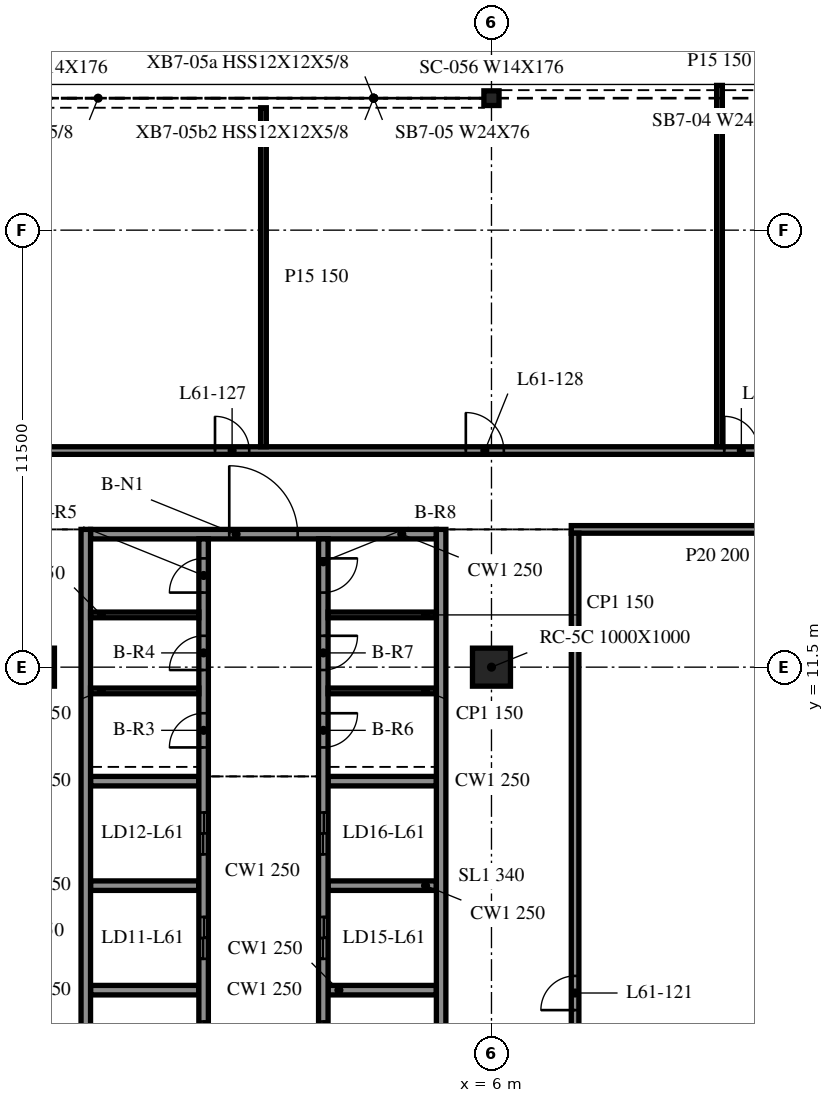
"""IFC4 building model, lengths in metres.
Left out: names, types, materials, properties, quantities, classifications, styles, units other than length and angle.
Written with IfcOpenShell. Run it as: python <this file> out.ifc"""

import sys

from ifc_helpers import new_model, si_unit, direction, frame, frame_2d, origin, origin_2d, place, context, subcontext, project, spatial, rectangle, i_section, extrude, element, fill, save


model = new_model("IFC4")
c1 = context("Model", 3, precision=1e-05, world=origin(), true_north=direction((0.0, 1.0)))
c2 = subcontext(c1, "Body", "Model", "MODEL_VIEW")
j1 = project(units=[si_unit("LENGTHUNIT", "METRE"), si_unit("PLANEANGLEUNIT", "RADIAN")], contexts=[c1])
p1 = place(None, origin())
s1 = spatial("IfcSite", under=j1, at=p1, CompositionType="ELEMENT")
p2 = place(p1, origin())
s2 = spatial("IfcBuilding", under=s1, at=p2, CompositionType="ELEMENT")
p3 = place(p2, frame((0.0, 0.0, 251.4)))
s3 = spatial("IfcBuildingStorey", under=s2, at=p3, CompositionType="ELEMENT", Elevation=251.4)
for number, where, z_axis, x_axis in (
    (1, (-6.0, 11.5, -0.34), (0.0, 0.0, 1.0), (1.0, 0.0, 0.0)),
    (2, (6.0, 11.5, -0.34), (0.0, 0.0, 1.0), (1.0, 0.0, 0.0)),
):
    element("IfcColumn", number, at=place(p3, frame(where, z_axis=z_axis, x_axis=x_axis)), inside=s3, PredefinedType="COLUMN", context=c2, shape_type="SweptSolid", body=[
        extrude(rectangle(XDim=1.0, YDim=1.0, at=origin_2d()), origin(), (0.0, 0.0, 1.0), 3.8),
    ])
p4 = place(p3, frame((6.0, 26.473, -0.34), z_axis=(0.0, 0.0, 1.0), x_axis=(1.0, 0.0, 0.0)))
e3 = element("IfcColumn", 3, at=p4, inside=s3, PredefinedType="COLUMN", context=c2, shape_type="SweptSolid", body=[
    extrude(i_section(OverallWidth=0.399, OverallDepth=0.386, WebThickness=0.021, FlangeThickness=0.033, at=origin_2d()), origin(), (0.0, 0.0, 1.0), 3.8),
])
for number, where, z_axis, x_axis in (
    (4, (-4.675, 15.125, 0.0), (0.0, 0.0, 1.0), (0.0, -1.0, 0.0)),
    (5, (4.675, -9.125, 0.0), (0.0, 0.0, 1.0), (0.0, 1.0, 0.0)),
):
    element("IfcWall", number, at=place(p3, frame(where, z_axis=z_axis, x_axis=x_axis)), inside=s3, PredefinedType="SOLIDWALL", context=c2, shape_type="SweptSolid", body=[
        extrude(rectangle(XDim=24.25, YDim=0.25, at=frame_2d((12.125, 0.0))), origin(), (0.0, 0.0, 1.0), 3.46),
    ])
p5 = place(p3, frame((-4.55, 15.0, 0.0), z_axis=(0.0, 0.0, 1.0), x_axis=(1.0, 0.0, 0.0)))
e6 = element("IfcWall", 6, at=p5, inside=s3, PredefinedType="SOLIDWALL", context=c2, shape_type="SweptSolid", body=[
    extrude(rectangle(XDim=9.1, YDim=0.25, at=frame_2d((4.55, 0.0))), origin(), (0.0, 0.0, 1.0), 3.46),
])
p6 = place(p5, frame((3.65, 0.0, 0.0)))
e7 = element("IfcOpeningElement", 7, at=p6, cuts=e6, PredefinedType="OPENING", context=c2, shape_type="SweptSolid", body=[
    extrude(rectangle(XDim=1.8, YDim=2.1, at=frame_2d((0.9, 1.05))), frame((0.0, 0.135, 0.0), z_axis=(0.0, -1.0, 0.0), x_axis=(1.0, 0.0, 0.0)), (0.0, 0.0, 1.0), 0.27),
])
p7 = place(p3, frame((-1.575, -8.875, 0.0), z_axis=(0.0, 0.0, 1.0), x_axis=(0.0, 1.0, 0.0)))
e8 = element("IfcWall", 8, at=p7, inside=s3, PredefinedType="SOLIDWALL", context=c2, shape_type="SweptSolid", body=[
    extrude(rectangle(XDim=23.75, YDim=0.25, at=frame_2d((11.875, 0.0))), origin(), (0.0, 0.0, 1.0), 3.46),
])
p8 = place(p7, frame((7.2, 0.0, 0.0)))
e9 = element("IfcOpeningElement", 9, at=p8, cuts=e8, PredefinedType="OPENING", context=c2, shape_type="SweptSolid", body=[
    extrude(rectangle(XDim=1.1, YDim=2.1, at=frame_2d((0.55, 1.05))), frame((0.0, 0.135, 0.0), z_axis=(0.0, -1.0, 0.0), x_axis=(1.0, 0.0, 0.0)), (0.0, 0.0, 1.0), 0.27),
])
p9 = place(p7, frame((9.95, 0.0, 0.0)))
e10 = element("IfcOpeningElement", 10, at=p9, cuts=e8, PredefinedType="OPENING", context=c2, shape_type="SweptSolid", body=[
    extrude(rectangle(XDim=1.1, YDim=2.1, at=frame_2d((0.55, 1.05))), frame((0.0, 0.135, 0.0), z_axis=(0.0, -1.0, 0.0), x_axis=(1.0, 0.0, 0.0)), (0.0, 0.0, 1.0), 0.27),
])
p10 = place(p7, frame((12.7, 0.0, 0.0)))
e11 = element("IfcOpeningElement", 11, at=p10, cuts=e8, PredefinedType="OPENING", context=c2, shape_type="SweptSolid", body=[
    extrude(rectangle(XDim=1.1, YDim=2.1, at=frame_2d((0.55, 1.05))), frame((0.0, 0.135, 0.0), z_axis=(0.0, -1.0, 0.0), x_axis=(1.0, 0.0, 0.0)), (0.0, 0.0, 1.0), 0.27),
])
p11 = place(p7, frame((15.45, 0.0, 0.0)))
e12 = element("IfcOpeningElement", 12, at=p11, cuts=e8, PredefinedType="OPENING", context=c2, shape_type="SweptSolid", body=[
    extrude(rectangle(XDim=1.1, YDim=2.1, at=frame_2d((0.55, 1.05))), frame((0.0, 0.135, 0.0), z_axis=(0.0, -1.0, 0.0), x_axis=(1.0, 0.0, 0.0)), (0.0, 0.0, 1.0), 0.27),
])
p12 = place(p7, frame((1.012, 0.0, 0.0)))
e13 = element("IfcOpeningElement", 13, at=p12, cuts=e8, PredefinedType="OPENING", context=c2, shape_type="SweptSolid", body=[
    extrude(rectangle(XDim=0.9, YDim=2.1, at=frame_2d((0.45, 1.05))), frame((0.0, 0.135, 0.0), z_axis=(0.0, -1.0, 0.0), x_axis=(1.0, 0.0, 0.0)), (0.0, 0.0, 1.0), 0.27),
])
p13 = place(p7, frame((4.087, 0.0, 0.0)))
e14 = element("IfcOpeningElement", 14, at=p13, cuts=e8, PredefinedType="OPENING", context=c2, shape_type="SweptSolid", body=[
    extrude(rectangle(XDim=0.9, YDim=2.1, at=frame_2d((0.45, 1.05))), frame((0.0, 0.135, 0.0), z_axis=(0.0, -1.0, 0.0), x_axis=(1.0, 0.0, 0.0)), (0.0, 0.0, 1.0), 0.27),
])
p14 = place(p7, frame((18.262, 0.0, 0.0)))
e15 = element("IfcOpeningElement", 15, at=p14, cuts=e8, PredefinedType="OPENING", context=c2, shape_type="SweptSolid", body=[
    extrude(rectangle(XDim=0.9, YDim=2.1, at=frame_2d((0.45, 1.05))), frame((0.0, 0.135, 0.0), z_axis=(0.0, -1.0, 0.0), x_axis=(1.0, 0.0, 0.0)), (0.0, 0.0, 1.0), 0.27),
])
p15 = place(p7, frame((20.3, 0.0, 0.0)))
e16 = element("IfcOpeningElement", 16, at=p15, cuts=e8, PredefinedType="OPENING", context=c2, shape_type="SweptSolid", body=[
    extrude(rectangle(XDim=0.9, YDim=2.1, at=frame_2d((0.45, 1.05))), frame((0.0, 0.135, 0.0), z_axis=(0.0, -1.0, 0.0), x_axis=(1.0, 0.0, 0.0)), (0.0, 0.0, 1.0), 0.27),
])
p16 = place(p7, frame((22.337, 0.0, 0.0)))
e17 = element("IfcOpeningElement", 17, at=p16, cuts=e8, PredefinedType="OPENING", context=c2, shape_type="SweptSolid", body=[
    extrude(rectangle(XDim=0.9, YDim=2.1, at=frame_2d((0.45, 1.05))), frame((0.0, 0.135, 0.0), z_axis=(0.0, -1.0, 0.0), x_axis=(1.0, 0.0, 0.0)), (0.0, 0.0, 1.0), 0.27),
])
p17 = place(p3, frame((1.575, 14.875, 0.0), z_axis=(0.0, 0.0, 1.0), x_axis=(0.0, -1.0, 0.0)))
e18 = element("IfcWall", 18, at=p17, inside=s3, PredefinedType="SOLIDWALL", context=c2, shape_type="SweptSolid", body=[
    extrude(rectangle(XDim=17.5, YDim=0.25, at=frame_2d((8.75, 0.0))), origin(), (0.0, 0.0, 1.0), 3.46),
])
p18 = place(p17, frame((15.45, 0.0, 0.0)))
e19 = element("IfcOpeningElement", 19, at=p18, cuts=e18, PredefinedType="OPENING", context=c2, shape_type="SweptSolid", body=[
    extrude(rectangle(XDim=1.1, YDim=2.1, at=frame_2d((0.55, 1.05))), frame((0.0, 0.135, 0.0), z_axis=(0.0, -1.0, 0.0), x_axis=(1.0, 0.0, 0.0)), (0.0, 0.0, 1.0), 0.27),
])
p19 = place(p17, frame((12.7, 0.0, 0.0)))
e20 = element("IfcOpeningElement", 20, at=p19, cuts=e18, PredefinedType="OPENING", context=c2, shape_type="SweptSolid", body=[
    extrude(rectangle(XDim=1.1, YDim=2.1, at=frame_2d((0.55, 1.05))), frame((0.0, 0.135, 0.0), z_axis=(0.0, -1.0, 0.0), x_axis=(1.0, 0.0, 0.0)), (0.0, 0.0, 1.0), 0.27),
])
p20 = place(p17, frame((9.95, 0.0, 0.0)))
e21 = element("IfcOpeningElement", 21, at=p20, cuts=e18, PredefinedType="OPENING", context=c2, shape_type="SweptSolid", body=[
    extrude(rectangle(XDim=1.1, YDim=2.1, at=frame_2d((0.55, 1.05))), frame((0.0, 0.135, 0.0), z_axis=(0.0, -1.0, 0.0), x_axis=(1.0, 0.0, 0.0)), (0.0, 0.0, 1.0), 0.27),
])
p21 = place(p17, frame((7.2, 0.0, 0.0)))
e22 = element("IfcOpeningElement", 22, at=p21, cuts=e18, PredefinedType="OPENING", context=c2, shape_type="SweptSolid", body=[
    extrude(rectangle(XDim=1.1, YDim=2.1, at=frame_2d((0.55, 1.05))), frame((0.0, 0.135, 0.0), z_axis=(0.0, -1.0, 0.0), x_axis=(1.0, 0.0, 0.0)), (0.0, 0.0, 1.0), 0.27),
])
p22 = place(p17, frame((4.587, 0.0, 0.0)))
e23 = element("IfcOpeningElement", 23, at=p22, cuts=e18, PredefinedType="OPENING", context=c2, shape_type="SweptSolid", body=[
    extrude(rectangle(XDim=0.9, YDim=2.1, at=frame_2d((0.45, 1.05))), frame((0.0, 0.135, 0.0), z_axis=(0.0, -1.0, 0.0), x_axis=(1.0, 0.0, 0.0)), (0.0, 0.0, 1.0), 0.27),
])
p23 = place(p17, frame((2.55, 0.0, 0.0)))
e24 = element("IfcOpeningElement", 24, at=p23, cuts=e18, PredefinedType="OPENING", context=c2, shape_type="SweptSolid", body=[
    extrude(rectangle(XDim=0.9, YDim=2.1, at=frame_2d((0.45, 1.05))), frame((0.0, 0.135, 0.0), z_axis=(0.0, -1.0, 0.0), x_axis=(1.0, 0.0, 0.0)), (0.0, 0.0, 1.0), 0.27),
])
p24 = place(p17, frame((0.512, 0.0, 0.0)))
e25 = element("IfcOpeningElement", 25, at=p24, cuts=e18, PredefinedType="OPENING", context=c2, shape_type="SweptSolid", body=[
    extrude(rectangle(XDim=0.9, YDim=2.1, at=frame_2d((0.45, 1.05))), frame((0.0, 0.135, 0.0), z_axis=(0.0, -1.0, 0.0), x_axis=(1.0, 0.0, 0.0)), (0.0, 0.0, 1.0), 0.27),
])
for number, where, z_axis, x_axis in (
    (26, (-4.55, 3.0, 0.0), (0.0, 0.0, 1.0), (1.0, 0.0, 0.0)),
    (27, (-4.55, 5.75, 0.0), (0.0, 0.0, 1.0), (1.0, 0.0, 0.0)),
    (28, (-4.55, 8.5, 0.0), (0.0, 0.0, 1.0), (1.0, 0.0, 0.0)),
    (29, (1.7, 3.0, 0.0), (0.0, 0.0, 1.0), (1.0, 0.0, 0.0)),
    (30, (1.7, 5.75, 0.0), (0.0, 0.0, 1.0), (1.0, 0.0, 0.0)),
    (31, (1.7, 8.5, 0.0), (0.0, 0.0, 1.0), (1.0, 0.0, 0.0)),
):
    element("IfcWall", number, at=place(p3, frame(where, z_axis=z_axis, x_axis=x_axis)), inside=s3, PredefinedType="SOLIDWALL", context=c2, shape_type="SweptSolid", body=[
        extrude(rectangle(XDim=2.85, YDim=0.25, at=frame_2d((1.425, 0.0))), origin(), (0.0, 0.0, 1.0), 3.46),
    ])
for number, where, z_axis, x_axis in (
    (32, (-4.55, 10.875, 0.0), (0.0, 0.0, 1.0), (1.0, 0.0, 0.0)),
    (33, (-4.55, 12.875, 0.0), (0.0, 0.0, 1.0), (1.0, 0.0, 0.0)),
    (34, (1.7, 10.875, 0.0), (0.0, 0.0, 1.0), (1.0, 0.0, 0.0)),
    (35, (1.7, 12.875, 0.0), (0.0, 0.0, 1.0), (1.0, 0.0, 0.0)),
):
    element("IfcWall", number, at=place(p3, frame(where, z_axis=z_axis, x_axis=x_axis)), inside=s3, PredefinedType="PARTITIONING", context=c2, shape_type="SweptSolid", body=[
        extrude(rectangle(XDim=2.85, YDim=0.15, at=frame_2d((1.425, 0.0))), origin(), (0.0, 0.0, 1.0), 3.46),
    ])
p25 = place(p3, frame((8.1, 15.125, 0.0), z_axis=(0.0, 0.0, 1.0), x_axis=(1.0, 0.0, 0.0)))
e36 = element("IfcWall", 36, at=p25, inside=s3, PredefinedType="PARTITIONING", context=c2, shape_type="SweptSolid", body=[
    extrude(rectangle(XDim=7.7, YDim=0.2, at=frame_2d((3.85, 0.0))), origin(), (0.0, 0.0, 1.0), 3.46),
])
p26 = place(p3, frame((-41.975, 17.2, 0.0), z_axis=(0.0, 0.0, 1.0), x_axis=(1.0, 0.0, 0.0)))
e37 = element("IfcWall", 37, at=p26, inside=s3, PredefinedType="PARTITIONING", context=c2, shape_type="SweptSolid", body=[
    extrude(rectangle(XDim=95.95, YDim=0.2, at=frame_2d((47.975, 0.0))), origin(), (0.0, 0.0, 1.0), 3.46),
])
p27 = place(p26, frame((10.5, 0.0, 0.0)))
e38 = element("IfcOpeningElement", 38, at=p27, cuts=e37, PredefinedType="OPENING", context=c2, shape_type="SweptSolid", body=[
    extrude(rectangle(XDim=1.0, YDim=2.1, at=frame_2d((0.5, 1.05))), frame((0.0, 0.11, 0.0), z_axis=(0.0, -1.0, 0.0), x_axis=(1.0, 0.0, 0.0)), (0.0, 0.0, 1.0), 0.22),
])
p28 = place(p26, frame((22.5, 0.0, 0.0)))
e39 = element("IfcOpeningElement", 39, at=p28, cuts=e37, PredefinedType="OPENING", context=c2, shape_type="SweptSolid", body=[
    extrude(rectangle(XDim=1.0, YDim=2.1, at=frame_2d((0.5, 1.05))), frame((0.0, 0.11, 0.0), z_axis=(0.0, -1.0, 0.0), x_axis=(1.0, 0.0, 0.0)), (0.0, 0.0, 1.0), 0.22),
])
p29 = place(p26, frame((28.5, 0.0, 0.0)))
e40 = element("IfcOpeningElement", 40, at=p29, cuts=e37, PredefinedType="OPENING", context=c2, shape_type="SweptSolid", body=[
    extrude(rectangle(XDim=1.0, YDim=2.1, at=frame_2d((0.5, 1.05))), frame((0.0, 0.11, 0.0), z_axis=(0.0, -1.0, 0.0), x_axis=(1.0, 0.0, 0.0)), (0.0, 0.0, 1.0), 0.22),
])
p30 = place(p26, frame((40.7, 0.0, 0.0)))
e41 = element("IfcOpeningElement", 41, at=p30, cuts=e37, PredefinedType="OPENING", context=c2, shape_type="SweptSolid", body=[
    extrude(rectangle(XDim=0.9, YDim=2.1, at=frame_2d((0.45, 1.05))), frame((0.0, 0.11, 0.0), z_axis=(0.0, -1.0, 0.0), x_axis=(1.0, 0.0, 0.0)), (0.0, 0.0, 1.0), 0.22),
])
p31 = place(p26, frame((47.3, 0.0, 0.0)))
e42 = element("IfcOpeningElement", 42, at=p31, cuts=e37, PredefinedType="OPENING", context=c2, shape_type="SweptSolid", body=[
    extrude(rectangle(XDim=1.0, YDim=2.1, at=frame_2d((0.5, 1.05))), frame((0.0, 0.11, 0.0), z_axis=(0.0, -1.0, 0.0), x_axis=(1.0, 0.0, 0.0)), (0.0, 0.0, 1.0), 0.22),
])
p32 = place(p26, frame((54.1, 0.0, 0.0)))
e43 = element("IfcOpeningElement", 43, at=p32, cuts=e37, PredefinedType="OPENING", context=c2, shape_type="SweptSolid", body=[
    extrude(rectangle(XDim=0.9, YDim=2.1, at=frame_2d((0.45, 1.05))), frame((0.0, 0.11, 0.0), z_axis=(0.0, -1.0, 0.0), x_axis=(1.0, 0.0, 0.0)), (0.0, 0.0, 1.0), 0.22),
])
p33 = place(p26, frame((60.1, 0.0, 0.0)))
e44 = element("IfcOpeningElement", 44, at=p33, cuts=e37, PredefinedType="OPENING", context=c2, shape_type="SweptSolid", body=[
    extrude(rectangle(XDim=1.0, YDim=2.1, at=frame_2d((0.5, 1.05))), frame((0.0, 0.11, 0.0), z_axis=(0.0, -1.0, 0.0), x_axis=(1.0, 0.0, 0.0)), (0.0, 0.0, 1.0), 0.22),
])
p34 = place(p26, frame((72.1, 0.0, 0.0)))
e45 = element("IfcOpeningElement", 45, at=p34, cuts=e37, PredefinedType="OPENING", context=c2, shape_type="SweptSolid", body=[
    extrude(rectangle(XDim=1.0, YDim=2.1, at=frame_2d((0.5, 1.05))), frame((0.0, 0.11, 0.0), z_axis=(0.0, -1.0, 0.0), x_axis=(1.0, 0.0, 0.0)), (0.0, 0.0, 1.0), 0.22),
])
p35 = place(p26, frame((84.1, 0.0, 0.0)))
e46 = element("IfcOpeningElement", 46, at=p35, cuts=e37, PredefinedType="OPENING", context=c2, shape_type="SweptSolid", body=[
    extrude(rectangle(XDim=1.0, YDim=2.1, at=frame_2d((0.5, 1.05))), frame((0.0, 0.11, 0.0), z_axis=(0.0, -1.0, 0.0), x_axis=(1.0, 0.0, 0.0)), (0.0, 0.0, 1.0), 0.22),
])
p36 = place(p26, frame((90.1, 0.0, 0.0)))
e47 = element("IfcOpeningElement", 47, at=p36, cuts=e37, PredefinedType="OPENING", context=c2, shape_type="SweptSolid", body=[
    extrude(rectangle(XDim=0.9, YDim=2.1, at=frame_2d((0.45, 1.05))), frame((0.0, 0.11, 0.0), z_axis=(0.0, -1.0, 0.0), x_axis=(1.0, 0.0, 0.0)), (0.0, 0.0, 1.0), 0.22),
])
p37 = place(p3, frame((0.0, 17.3, 0.0), z_axis=(0.0, 0.0, 1.0), x_axis=(0.0, 1.0, 0.0)))
e48 = element("IfcWall", 48, at=p37, inside=s3, PredefinedType="PARTITIONING", context=c2, shape_type="SweptSolid", body=[
    extrude(rectangle(XDim=8.921, YDim=0.15, at=frame_2d((4.46, 0.0))), origin(), (0.0, 0.0, 1.0), 3.46),
])
p38 = place(p3, frame((8.2, -9.025, 0.0), z_axis=(0.0, 0.0, 1.0), x_axis=(0.0, 1.0, 0.0)))
e49 = element("IfcWall", 49, at=p38, inside=s3, PredefinedType="PARTITIONING", context=c2, shape_type="SweptSolid", body=[
    extrude(rectangle(XDim=24.05, YDim=0.2, at=frame_2d((12.025, 0.0))), origin(), (0.0, 0.0, 1.0), 3.46),
])
p39 = place(p38, frame((11.5, 0.0, 0.0)))
e50 = element("IfcOpeningElement", 50, at=p39, cuts=e49, PredefinedType="OPENING", context=c2, shape_type="SweptSolid", body=[
    extrude(rectangle(XDim=0.9, YDim=2.1, at=frame_2d((0.45, 1.05))), frame((0.0, 0.11, 0.0), z_axis=(0.0, -1.0, 0.0), x_axis=(1.0, 0.0, 0.0)), (0.0, 0.0, 1.0), 0.22),
])
p40 = place(p3, frame((12.0, 17.3, 0.0), z_axis=(0.0, 0.0, 1.0), x_axis=(0.0, 1.0, 0.0)))
e51 = element("IfcWall", 51, at=p40, inside=s3, PredefinedType="PARTITIONING", context=c2, shape_type="SweptSolid", body=[
    extrude(rectangle(XDim=9.509, YDim=0.15, at=frame_2d((4.754, 0.0))), origin(), (0.0, 0.0, 1.0), 3.46),
])
p41 = place(p6, origin())
e52 = element("IfcDoor", 52, at=p41, inside=s3, OperationType="DOUBLE_DOOR_SINGLE_SWING", PredefinedType="DOOR", context=c2, shape_type="SweptSolid", body=[
    extrude(rectangle(XDim=1.8, YDim=2.1, at=frame_2d((0.9, 1.05))), frame((0.0, 0.025, 0.0), z_axis=(0.0, -1.0, 0.0), x_axis=(1.0, 0.0, 0.0)), (0.0, 0.0, 1.0), 0.05),
])
fill(e7, e52)
p42 = place(p19, origin())
e53 = element("IfcDoor", 53, at=p42, inside=s3, OperationType="DOUBLE_DOOR_SLIDING", PredefinedType="DOOR", context=c2, shape_type="SweptSolid", body=[
    extrude(rectangle(XDim=1.1, YDim=2.1, at=frame_2d((0.55, 1.05))), frame((0.0, 0.025, 0.0), z_axis=(0.0, -1.0, 0.0), x_axis=(1.0, 0.0, 0.0)), (0.0, 0.0, 1.0), 0.05),
])
fill(e20, e53)
p43 = place(p20, origin())
e54 = element("IfcDoor", 54, at=p43, inside=s3, OperationType="DOUBLE_DOOR_SLIDING", PredefinedType="DOOR", context=c2, shape_type="SweptSolid", body=[
    extrude(rectangle(XDim=1.1, YDim=2.1, at=frame_2d((0.55, 1.05))), frame((0.0, 0.025, 0.0), z_axis=(0.0, -1.0, 0.0), x_axis=(1.0, 0.0, 0.0)), (0.0, 0.0, 1.0), 0.05),
])
fill(e21, e54)
p44 = place(p21, origin())
e55 = element("IfcDoor", 55, at=p44, inside=s3, OperationType="DOUBLE_DOOR_SLIDING", PredefinedType="DOOR", context=c2, shape_type="SweptSolid", body=[
    extrude(rectangle(XDim=1.1, YDim=2.1, at=frame_2d((0.55, 1.05))), frame((0.0, 0.025, 0.0), z_axis=(0.0, -1.0, 0.0), x_axis=(1.0, 0.0, 0.0)), (0.0, 0.0, 1.0), 0.05),
])
fill(e22, e55)
p45 = place(p9, origin())
e56 = element("IfcDoor", 56, at=p45, inside=s3, OperationType="DOUBLE_DOOR_SLIDING", PredefinedType="DOOR", context=c2, shape_type="SweptSolid", body=[
    extrude(rectangle(XDim=1.1, YDim=2.1, at=frame_2d((0.55, 1.05))), frame((0.0, 0.025, 0.0), z_axis=(0.0, -1.0, 0.0), x_axis=(1.0, 0.0, 0.0)), (0.0, 0.0, 1.0), 0.05),
])
fill(e10, e56)
p46 = place(p10, origin())
e57 = element("IfcDoor", 57, at=p46, inside=s3, OperationType="DOUBLE_DOOR_SLIDING", PredefinedType="DOOR", context=c2, shape_type="SweptSolid", body=[
    extrude(rectangle(XDim=1.1, YDim=2.1, at=frame_2d((0.55, 1.05))), frame((0.0, 0.025, 0.0), z_axis=(0.0, -1.0, 0.0), x_axis=(1.0, 0.0, 0.0)), (0.0, 0.0, 1.0), 0.05),
])
fill(e11, e57)
p47 = place(p11, origin())
e58 = element("IfcDoor", 58, at=p47, inside=s3, OperationType="DOUBLE_DOOR_SLIDING", PredefinedType="DOOR", context=c2, shape_type="SweptSolid", body=[
    extrude(rectangle(XDim=1.1, YDim=2.1, at=frame_2d((0.55, 1.05))), frame((0.0, 0.025, 0.0), z_axis=(0.0, -1.0, 0.0), x_axis=(1.0, 0.0, 0.0)), (0.0, 0.0, 1.0), 0.05),
])
fill(e12, e58)
p48 = place(p14, origin())
e59 = element("IfcDoor", 59, at=p48, inside=s3, OperationType="SINGLE_SWING_LEFT", PredefinedType="DOOR", context=c2, shape_type="SweptSolid", body=[
    extrude(rectangle(XDim=0.9, YDim=2.1, at=frame_2d((0.45, 1.05))), frame((0.0, 0.025, 0.0), z_axis=(0.0, -1.0, 0.0), x_axis=(1.0, 0.0, 0.0)), (0.0, 0.0, 1.0), 0.05),
])
fill(e15, e59)
p49 = place(p15, origin())
e60 = element("IfcDoor", 60, at=p49, inside=s3, OperationType="SINGLE_SWING_RIGHT", PredefinedType="DOOR", context=c2, shape_type="SweptSolid", body=[
    extrude(rectangle(XDim=0.9, YDim=2.1, at=frame_2d((0.45, 1.05))), frame((0.0, 0.025, 0.0), z_axis=(0.0, -1.0, 0.0), x_axis=(1.0, 0.0, 0.0)), (0.0, 0.0, 1.0), 0.05),
])
fill(e16, e60)
p50 = place(p16, origin())
e61 = element("IfcDoor", 61, at=p50, inside=s3, OperationType="SINGLE_SWING_LEFT", PredefinedType="DOOR", context=c2, shape_type="SweptSolid", body=[
    extrude(rectangle(XDim=0.9, YDim=2.1, at=frame_2d((0.45, 1.05))), frame((0.0, 0.025, 0.0), z_axis=(0.0, -1.0, 0.0), x_axis=(1.0, 0.0, 0.0)), (0.0, 0.0, 1.0), 0.05),
])
fill(e17, e61)
p51 = place(p22, origin())
e62 = element("IfcDoor", 62, at=p51, inside=s3, OperationType="SINGLE_SWING_RIGHT", PredefinedType="DOOR", context=c2, shape_type="SweptSolid", body=[
    extrude(rectangle(XDim=0.9, YDim=2.1, at=frame_2d((0.45, 1.05))), frame((0.0, 0.025, 0.0), z_axis=(0.0, -1.0, 0.0), x_axis=(1.0, 0.0, 0.0)), (0.0, 0.0, 1.0), 0.05),
])
fill(e23, e62)
p52 = place(p23, origin())
e63 = element("IfcDoor", 63, at=p52, inside=s3, OperationType="SINGLE_SWING_LEFT", PredefinedType="DOOR", context=c2, shape_type="SweptSolid", body=[
    extrude(rectangle(XDim=0.9, YDim=2.1, at=frame_2d((0.45, 1.05))), frame((0.0, 0.025, 0.0), z_axis=(0.0, -1.0, 0.0), x_axis=(1.0, 0.0, 0.0)), (0.0, 0.0, 1.0), 0.05),
])
fill(e24, e63)
p53 = place(p24, origin())
e64 = element("IfcDoor", 64, at=p53, inside=s3, OperationType="SINGLE_SWING_RIGHT", PredefinedType="DOOR", context=c2, shape_type="SweptSolid", body=[
    extrude(rectangle(XDim=0.9, YDim=2.1, at=frame_2d((0.45, 1.05))), frame((0.0, 0.025, 0.0), z_axis=(0.0, -1.0, 0.0), x_axis=(1.0, 0.0, 0.0)), (0.0, 0.0, 1.0), 0.05),
])
fill(e25, e64)
p54 = place(p39, origin())
e65 = element("IfcDoor", 65, at=p54, inside=s3, OperationType="SINGLE_SWING_RIGHT", PredefinedType="DOOR", context=c2, shape_type="SweptSolid", body=[
    extrude(rectangle(XDim=0.9, YDim=2.1, at=frame_2d((0.45, 1.05))), frame((0.0, 0.025, 0.0), z_axis=(0.0, -1.0, 0.0), x_axis=(1.0, 0.0, 0.0)), (0.0, 0.0, 1.0), 0.05),
])
fill(e50, e65)
p55 = place(p30, origin())
e66 = element("IfcDoor", 66, at=p55, inside=s3, OperationType="SINGLE_SWING_LEFT", PredefinedType="DOOR", context=c2, shape_type="SweptSolid", body=[
    extrude(rectangle(XDim=0.9, YDim=2.1, at=frame_2d((0.45, 1.05))), frame((0.0, 0.025, 0.0), z_axis=(0.0, -1.0, 0.0), x_axis=(1.0, 0.0, 0.0)), (0.0, 0.0, 1.0), 0.05),
])
fill(e41, e66)
p56 = place(p31, origin())
e67 = element("IfcDoor", 67, at=p56, inside=s3, OperationType="SINGLE_SWING_LEFT", PredefinedType="DOOR", context=c2, shape_type="SweptSolid", body=[
    extrude(rectangle(XDim=1.0, YDim=2.1, at=frame_2d((0.5, 1.05))), frame((0.0, 0.025, 0.0), z_axis=(0.0, -1.0, 0.0), x_axis=(1.0, 0.0, 0.0)), (0.0, 0.0, 1.0), 0.05),
])
fill(e42, e67)
p57 = place(p32, origin())
e68 = element("IfcDoor", 68, at=p57, inside=s3, OperationType="SINGLE_SWING_RIGHT", PredefinedType="DOOR", context=c2, shape_type="SweptSolid", body=[
    extrude(rectangle(XDim=0.9, YDim=2.1, at=frame_2d((0.45, 1.05))), frame((0.0, 0.025, 0.0), z_axis=(0.0, -1.0, 0.0), x_axis=(1.0, 0.0, 0.0)), (0.0, 0.0, 1.0), 0.05),
])
fill(e43, e68)
save(model, sys.argv[1])
